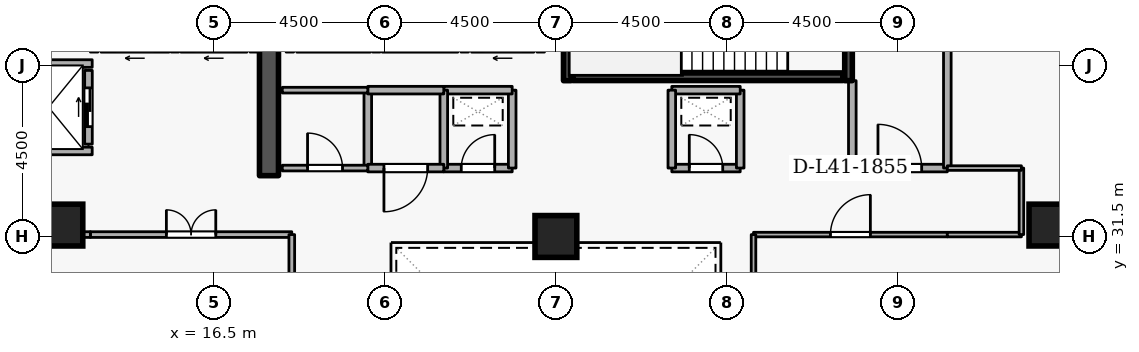
"""IFC4 building model, lengths in metres.
Left out: names, types, materials, properties, quantities, classifications, styles, units other than length and angle.
Written with IfcOpenShell. Run it as: python <this file> out.ifc"""

import sys

from ifc_helpers import new_model, si_unit, direction, frame, frame_2d, origin, origin_2d, place, context, subcontext, project, spatial, rectangle, extrude, element, fill, save


model = new_model("IFC4")
c1 = context("Model", 3, precision=1e-05, world=origin(), true_north=direction((0.0, 1.0)))
c2 = subcontext(c1, "Body", "Model", "MODEL_VIEW")
j1 = project(units=[si_unit("LENGTHUNIT", "METRE"), si_unit("PLANEANGLEUNIT", "RADIAN")], contexts=[c1])
p1 = place(None, origin())
s1 = spatial("IfcSite", under=j1, at=p1, CompositionType="ELEMENT")
p2 = place(p1, origin())
s2 = spatial("IfcBuilding", under=s1, at=p2, CompositionType="ELEMENT")
p3 = place(p2, frame((0.0, 0.0, 156.3)))
s3 = spatial("IfcBuildingStorey", under=s2, at=p3, CompositionType="ELEMENT", Elevation=156.3)
p4 = place(p3, frame((17.95, 33.1, 0.0), z_axis=(0.0, 0.0, 1.0), x_axis=(0.0, 1.0, 0.0)))
e1 = element("IfcWall", 1, at=p4, inside=s3, PredefinedType="SHEAR", context=c2, shape_type="SweptSolid", body=[
    extrude(rectangle(XDim=5.8, YDim=0.5, at=frame_2d((2.9, 0.0))), origin(), (0.0, 0.0, 1.0), 3.6),
])
for number, where, z_axis, x_axis in (
    (2, (12.5, 31.8, 0.0), (0.0, 0.0, 1.0), (1.0, 0.0, 0.0)),
    (3, (38.5, 31.8, 0.0), (0.0, 0.0, 1.0), (1.0, 0.0, 0.0)),
    (4, (25.5, 31.5, 0.0), (0.0, 0.0, 1.0), (1.0, 0.0, 0.0)),
):
    element("IfcColumn", number, at=place(p3, frame(where, z_axis=z_axis, x_axis=x_axis)), inside=s3, PredefinedType="COLUMN", context=c2, shape_type="SweptSolid", body=[
        extrude(rectangle(XDim=1.1, YDim=1.1, at=origin_2d()), origin(), (0.0, 0.0, 1.0), 3.6),
    ])
p5 = place(p3, frame((24.92, 36.45, 0.0), z_axis=(0.0, 0.0, 1.0), x_axis=(-1.0, 0.0, 0.0)))
e5 = element("IfcWall", 5, at=p5, inside=s3, PredefinedType="STANDARD", context=c2, shape_type="SweptSolid", body=[
    extrude(rectangle(XDim=1.64, YDim=0.2, at=frame_2d((0.82, 0.0))), origin(), (0.0, 0.0, 1.0), 3.34),
])
p6 = place(p5, frame((0.31, 0.0, 0.0)))
e6 = element("IfcOpeningElement", 6, at=p6, cuts=e5, PredefinedType="OPENING", context=c2, shape_type="SweptSolid", body=[
    extrude(rectangle(XDim=1.02, YDim=2.06, at=frame_2d((0.51, 1.03))), frame((0.0, 0.11, 0.0), z_axis=(0.0, -1.0, 0.0), x_axis=(1.0, 0.0, 0.0)), (0.0, 0.0, 1.0), 0.22),
])
p7 = place(p3, frame((22.92, 36.45, 0.0), z_axis=(0.0, 0.0, 1.0), x_axis=(-1.0, 0.0, 0.0)))
e7 = element("IfcWall", 7, at=p7, inside=s3, PredefinedType="STANDARD", context=c2, shape_type="SweptSolid", body=[
    extrude(rectangle(XDim=1.99, YDim=0.2, at=frame_2d((0.995, 0.0))), origin(), (0.0, 0.0, 1.0), 3.34),
])
p8 = place(p3, frame((20.62, 36.45, 0.0), z_axis=(0.0, 0.0, 1.0), x_axis=(-1.0, 0.0, 0.0)))
e8 = element("IfcWall", 8, at=p8, inside=s3, PredefinedType="STANDARD", context=c2, shape_type="SweptSolid", body=[
    extrude(rectangle(XDim=1.94, YDim=0.2, at=frame_2d((0.97, 0.0))), origin(), (0.0, 0.0, 1.0), 3.34),
])
p9 = place(p3, frame((17.37, 36.45, 0.0), z_axis=(0.0, 0.0, 1.0), x_axis=(-1.0, 0.0, 0.0)))
e9 = element("IfcWall", 9, at=p9, inside=s3, PredefinedType="STANDARD", context=c2, shape_type="SweptSolid", body=[
    extrude(rectangle(XDim=1.74, YDim=0.2, at=frame_2d((0.87, 0.0))), origin(), (0.0, 0.0, 1.0), 3.34),
])
p10 = place(p9, frame((0.36, 0.0, 0.0)))
e10 = element("IfcOpeningElement", 10, at=p10, cuts=e9, PredefinedType="OPENING", context=c2, shape_type="SweptSolid", body=[
    extrude(rectangle(XDim=1.02, YDim=2.06, at=frame_2d((0.51, 1.03))), frame((0.0, 0.11, 0.0), z_axis=(0.0, -1.0, 0.0), x_axis=(1.0, 0.0, 0.0)), (0.0, 0.0, 1.0), 0.22),
])
p11 = place(p3, frame((15.32, 36.45, 0.0), z_axis=(0.0, 0.0, 1.0), x_axis=(-1.0, 0.0, 0.0)))
e11 = element("IfcWall", 11, at=p11, inside=s3, PredefinedType="STANDARD", context=c2, shape_type="SweptSolid", body=[
    extrude(rectangle(XDim=1.79, YDim=0.2, at=frame_2d((0.895, 0.0))), origin(), (0.0, 0.0, 1.0), 3.34),
])
p12 = place(p11, frame((0.385, 0.0, 0.0)))
e12 = element("IfcOpeningElement", 12, at=p12, cuts=e11, PredefinedType="OPENING", context=c2, shape_type="SweptSolid", body=[
    extrude(rectangle(XDim=1.02, YDim=2.06, at=frame_2d((0.51, 1.03))), frame((0.0, 0.11, 0.0), z_axis=(0.0, -1.0, 0.0), x_axis=(1.0, 0.0, 0.0)), (0.0, 0.0, 1.0), 0.22),
])
p13 = place(p3, frame((13.2, 33.93, 0.0), z_axis=(0.0, 0.0, 1.0), x_axis=(0.0, 1.0, 0.0)))
e13 = element("IfcWall", 13, at=p13, inside=s3, PredefinedType="STANDARD", context=c2, shape_type="SweptSolid", body=[
    extrude(rectangle(XDim=1.94, YDim=0.2, at=frame_2d((0.97, 0.0))), origin(), (0.0, 0.0, 1.0), 3.34),
])
p14 = place(p13, frame((0.46, 0.0, 0.0)))
e14 = element("IfcOpeningElement", 14, at=p14, cuts=e13, PredefinedType="OPENING", context=c2, shape_type="SweptSolid", body=[
    extrude(rectangle(XDim=1.02, YDim=2.06, at=frame_2d((0.51, 1.03))), frame((0.0, 0.11, 0.0), z_axis=(0.0, -1.0, 0.0), x_axis=(1.0, 0.0, 0.0)), (0.0, 0.0, 1.0), 0.22),
])
for number, where, z_axis, x_axis in (
    (15, (11.002, 36.05, 0.0), (0.0, 0.0, 1.0), (1.0, 0.0, 0.0)),
    (16, (11.002, 33.75, 0.0), (0.0, 0.0, 1.0), (1.0, 0.0, 0.0)),
):
    element("IfcWall", number, at=place(p3, frame(where, z_axis=z_axis, x_axis=x_axis)), inside=s3, PredefinedType="STANDARD", context=c2, shape_type="SweptSolid", body=[
        extrude(rectangle(XDim=2.296, YDim=0.2, at=frame_2d((1.148, 0.0))), origin(), (0.0, 0.0, 1.0), 3.34),
    ])
p15 = place(p3, frame((33.2, 38.95, 0.0), z_axis=(0.0, 0.0, 1.0), x_axis=(0.0, -1.0, 0.0)))
e17 = element("IfcWall", 17, at=p15, inside=s3, PredefinedType="SHEAR", context=c2, shape_type="SweptSolid", body=[
    extrude(rectangle(XDim=3.35, YDim=0.2, at=frame_2d((1.675, 0.0))), origin(), (0.0, 0.0, 1.0), 3.6),
])
p16 = place(p15, frame((1.125, 0.0, 0.0)))
e18 = element("IfcOpeningElement", 18, at=p16, cuts=e17, PredefinedType="OPENING", context=c2, shape_type="SweptSolid", body=[
    extrude(rectangle(XDim=1.1, YDim=2.1, at=frame_2d((0.55, 1.05))), frame((0.0, 0.11, 0.0), z_axis=(0.0, -1.0, 0.0), x_axis=(1.0, 0.0, 0.0)), (0.0, 0.0, 1.0), 0.22),
])
p17 = place(p3, frame((25.8, 35.6, 0.0), z_axis=(0.0, 0.0, 1.0), x_axis=(0.0, 1.0, 0.0)))
e19 = element("IfcWall", 19, at=p17, inside=s3, PredefinedType="SHEAR", context=c2, shape_type="SweptSolid", body=[
    extrude(rectangle(XDim=3.35, YDim=0.2, at=frame_2d((1.675, 0.0))), origin(), (0.0, 0.0, 1.0), 3.6),
])
p18 = place(p3, frame((25.95, 35.703, 0.0), z_axis=(0.0, 0.0, 1.0), x_axis=(1.0, 0.0, 0.0)))
e20 = element("IfcWall", 20, at=p18, inside=s3, PredefinedType="SHEAR", context=c2, shape_type="SweptSolid", body=[
    extrude(rectangle(XDim=7.1, YDim=0.2, at=frame_2d((3.55, 0.0))), origin(), (0.0, 0.0, 1.0), 3.6),
])
p19 = place(p3, frame((33.3, 33.3, 0.0), z_axis=(0.0, 0.0, 1.0), x_axis=(1.0, 0.0, 0.0)))
e21 = element("IfcWall", 21, at=p19, inside=s3, PredefinedType="STANDARD", context=c2, shape_type="SweptSolid", body=[
    extrude(rectangle(XDim=2.5, YDim=0.2, at=frame_2d((1.25, 0.0))), origin(), (0.0, 0.0, 1.0), 3.34),
])
p20 = place(p19, frame((0.675, 0.0, 0.0)))
e22 = element("IfcOpeningElement", 22, at=p20, cuts=e21, PredefinedType="OPENING", context=c2, shape_type="SweptSolid", body=[
    extrude(rectangle(XDim=1.15, YDim=2.1, at=frame_2d((0.575, 1.05))), frame((0.0, 0.11, 0.0), z_axis=(0.0, -1.0, 0.0), x_axis=(1.0, 0.0, 0.0)), (0.0, 0.0, 1.0), 0.22),
])
p21 = place(p3, frame((35.8, 33.3, 0.0), z_axis=(0.0, 0.0, 1.0), x_axis=(0.0, 1.0, 0.0)))
e23 = element("IfcWall", 23, at=p21, inside=s3, PredefinedType="STANDARD", context=c2, shape_type="SweptSolid", body=[
    extrude(rectangle(XDim=5.7, YDim=0.2, at=frame_2d((2.85, 0.0))), origin(), (0.0, 0.0, 1.0), 3.34),
])
p22 = place(p3, frame((33.3, 35.6, 0.0), z_axis=(0.0, 0.0, 1.0), x_axis=(0.0, -1.0, 0.0)))
e24 = element("IfcWall", 24, at=p22, inside=s3, PredefinedType="STANDARD", context=c2, shape_type="SweptSolid", body=[
    extrude(rectangle(XDim=2.3, YDim=0.2, at=frame_2d((1.15, 0.0))), origin(), (0.0, 0.0, 1.0), 2.545),
])
p23 = place(p3, frame((22.55, 33.3, 0.0), z_axis=(0.0, 0.0, 1.0), x_axis=(1.0, 0.0, 0.0)))
e25 = element("IfcWall", 25, at=p23, inside=s3, PredefinedType="STANDARD", context=c2, shape_type="SweptSolid", body=[
    extrude(rectangle(XDim=1.8, YDim=0.2, at=frame_2d((0.9, 0.0))), origin(), (0.0, 0.0, 1.0), 3.34),
])
p24 = place(p23, frame((0.46, 0.0, 0.0)))
e26 = element("IfcOpeningElement", 26, at=p24, cuts=e25, PredefinedType="OPENING", context=c2, shape_type="SweptSolid", body=[
    extrude(rectangle(XDim=0.88, YDim=2.04, at=frame_2d((0.44, 1.02))), frame((0.0, 0.11, 0.0), z_axis=(0.0, -1.0, 0.0), x_axis=(1.0, 0.0, 0.0)), (0.0, 0.0, 1.0), 0.22),
])
p25 = place(p3, frame((24.35, 33.3, 0.0), z_axis=(0.0, 0.0, 1.0), x_axis=(0.0, 1.0, 0.0)))
e27 = element("IfcWall", 27, at=p25, inside=s3, PredefinedType="STANDARD", context=c2, shape_type="SweptSolid", body=[
    extrude(rectangle(XDim=2.05, YDim=0.2, at=frame_2d((1.025, 0.0))), origin(), (0.0, 0.0, 1.0), 3.34),
])
p26 = place(p3, frame((24.35, 35.35, 0.0), z_axis=(0.0, 0.0, 1.0), x_axis=(-1.0, 0.0, 0.0)))
e28 = element("IfcWall", 28, at=p26, inside=s3, PredefinedType="STANDARD", context=c2, shape_type="SweptSolid", body=[
    extrude(rectangle(XDim=1.8, YDim=0.2, at=frame_2d((0.9, 0.0))), origin(), (0.0, 0.0, 1.0), 3.34),
])
p27 = place(p3, frame((22.55, 35.35, 0.0), z_axis=(0.0, 0.0, 1.0), x_axis=(0.0, -1.0, 0.0)))
e29 = element("IfcWall", 29, at=p27, inside=s3, PredefinedType="STANDARD", context=c2, shape_type="SweptSolid", body=[
    extrude(rectangle(XDim=2.05, YDim=0.2, at=frame_2d((1.025, 0.0))), origin(), (0.0, 0.0, 1.0), 3.34),
])
p28 = place(p3, frame((28.55, 33.3, 0.0), z_axis=(0.0, 0.0, 1.0), x_axis=(1.0, 0.0, 0.0)))
e30 = element("IfcWall", 30, at=p28, inside=s3, PredefinedType="STANDARD", context=c2, shape_type="SweptSolid", body=[
    extrude(rectangle(XDim=1.8, YDim=0.2, at=frame_2d((0.9, 0.0))), origin(), (0.0, 0.0, 1.0), 3.34),
])
p29 = place(p28, frame((0.46, 0.0, 0.0)))
e31 = element("IfcOpeningElement", 31, at=p29, cuts=e30, PredefinedType="OPENING", context=c2, shape_type="SweptSolid", body=[
    extrude(rectangle(XDim=0.88, YDim=2.04, at=frame_2d((0.44, 1.02))), frame((0.0, 0.11, 0.0), z_axis=(0.0, -1.0, 0.0), x_axis=(1.0, 0.0, 0.0)), (0.0, 0.0, 1.0), 0.22),
])
p30 = place(p3, frame((30.35, 33.3, 0.0), z_axis=(0.0, 0.0, 1.0), x_axis=(0.0, 1.0, 0.0)))
e32 = element("IfcWall", 32, at=p30, inside=s3, PredefinedType="STANDARD", context=c2, shape_type="SweptSolid", body=[
    extrude(rectangle(XDim=2.05, YDim=0.2, at=frame_2d((1.025, 0.0))), origin(), (0.0, 0.0, 1.0), 3.34),
])
p31 = place(p3, frame((30.35, 35.35, 0.0), z_axis=(0.0, 0.0, 1.0), x_axis=(-1.0, 0.0, 0.0)))
e33 = element("IfcWall", 33, at=p31, inside=s3, PredefinedType="STANDARD", context=c2, shape_type="SweptSolid", body=[
    extrude(rectangle(XDim=1.8, YDim=0.2, at=frame_2d((0.9, 0.0))), origin(), (0.0, 0.0, 1.0), 3.34),
])
for number, where, z_axis, x_axis in (
    (34, (28.55, 35.35, 0.0), (0.0, 0.0, 1.0), (0.0, -1.0, 0.0)),
    (35, (20.55, 33.3, 0.0), (0.0, 0.0, 1.0), (0.0, 1.0, 0.0)),
):
    element("IfcWall", number, at=place(p3, frame(where, z_axis=z_axis, x_axis=x_axis)), inside=s3, PredefinedType="STANDARD", context=c2, shape_type="SweptSolid", body=[
        extrude(rectangle(XDim=2.05, YDim=0.2, at=frame_2d((1.025, 0.0))), origin(), (0.0, 0.0, 1.0), 3.34),
    ])
p32 = place(p3, frame((20.55, 35.35, 0.0), z_axis=(0.0, 0.0, 1.0), x_axis=(1.0, 0.0, 0.0)))
e36 = element("IfcWall", 36, at=p32, inside=s3, PredefinedType="STANDARD", context=c2, shape_type="SweptSolid", body=[
    extrude(rectangle(XDim=2.0, YDim=0.2, at=frame_2d((1.0, 0.0))), origin(), (0.0, 0.0, 1.0), 3.34),
])
p33 = place(p3, frame((22.55, 33.3, 0.0), z_axis=(0.0, 0.0, 1.0), x_axis=(-1.0, 0.0, 0.0)))
e37 = element("IfcWall", 37, at=p33, inside=s3, PredefinedType="STANDARD", context=c2, shape_type="SweptSolid", body=[
    extrude(rectangle(XDim=2.0, YDim=0.2, at=frame_2d((1.0, 0.0))), origin(), (0.0, 0.0, 1.0), 3.34),
])
p34 = place(p33, frame((0.425, 0.0, 0.0)))
e38 = element("IfcOpeningElement", 38, at=p34, cuts=e37, PredefinedType="OPENING", context=c2, shape_type="SweptSolid", body=[
    extrude(rectangle(XDim=1.15, YDim=2.1, at=frame_2d((0.575, 1.05))), frame((0.0, 0.11, 0.0), z_axis=(0.0, -1.0, 0.0), x_axis=(1.0, 0.0, 0.0)), (0.0, 0.0, 1.0), 0.22),
])
p35 = place(p3, frame((18.3, 33.3, 0.0), z_axis=(0.0, 0.0, 1.0), x_axis=(1.0, 0.0, 0.0)))
e39 = element("IfcWall", 39, at=p35, inside=s3, PredefinedType="PARTITIONING", context=c2, shape_type="SweptSolid", body=[
    extrude(rectangle(XDim=2.25, YDim=0.15, at=frame_2d((1.125, 0.0))), origin(), (0.0, 0.0, 1.0), 3.34),
])
p36 = place(p35, frame((0.665, 0.0, 0.0)))
e40 = element("IfcOpeningElement", 40, at=p36, cuts=e39, PredefinedType="OPENING", context=c2, shape_type="SweptSolid", body=[
    extrude(rectangle(XDim=0.92, YDim=2.08, at=frame_2d((0.46, 1.04))), frame((0.0, 0.085, 0.0), z_axis=(0.0, -1.0, 0.0), x_axis=(1.0, 0.0, 0.0)), (0.0, 0.0, 1.0), 0.17),
])
p37 = place(p3, frame((20.55, 35.35, 0.0), z_axis=(0.0, 0.0, 1.0), x_axis=(-1.0, 0.0, 0.0)))
e41 = element("IfcWall", 41, at=p37, inside=s3, PredefinedType="PARTITIONING", context=c2, shape_type="SweptSolid", body=[
    extrude(rectangle(XDim=2.25, YDim=0.15, at=frame_2d((1.125, 0.0))), origin(), (0.0, 0.0, 1.0), 3.34),
])
p38 = place(p3, frame((13.25, 31.55, 0.0), z_axis=(0.0, 0.0, 1.0), x_axis=(1.0, 0.0, 0.0)))
e42 = element("IfcWall", 42, at=p38, inside=s3, PredefinedType="PARTITIONING", context=c2, shape_type="SweptSolid", body=[
    extrude(rectangle(XDim=5.3, YDim=0.15, at=frame_2d((2.65, 0.0))), origin(), (0.0, 0.0, 1.0), 3.34),
])
p39 = place(p38, frame((2.0, 0.0, 0.0)))
e43 = element("IfcOpeningElement", 43, at=p39, cuts=e42, PredefinedType="OPENING", context=c2, shape_type="SweptSolid", body=[
    extrude(rectangle(XDim=1.3, YDim=2.12, at=frame_2d((0.65, 1.06))), frame((0.0, 0.085, 0.0), z_axis=(0.0, -1.0, 0.0), x_axis=(1.0, 0.0, 0.0)), (0.0, 0.0, 1.0), 0.17),
])
p40 = place(p3, frame((18.55, 31.55, 0.0), z_axis=(0.0, 0.0, 1.0), x_axis=(0.0, -1.0, 0.0)))
e44 = element("IfcWall", 44, at=p40, inside=s3, PredefinedType="PARTITIONING", context=c2, shape_type="SweptSolid", body=[
    extrude(rectangle(XDim=4.55, YDim=0.15, at=frame_2d((2.275, 0.0))), origin(), (0.0, 0.0, 1.0), 3.34),
])
p41 = place(p3, frame((10.9, 31.55, 0.0), z_axis=(0.0, 0.0, 1.0), x_axis=(1.0, 0.0, 0.0)))
e45 = element("IfcWall", 45, at=p41, inside=s3, PredefinedType="PARTITIONING", context=c2, shape_type="SweptSolid", body=[
    extrude(rectangle(XDim=2.35, YDim=0.15, at=frame_2d((1.175, 0.0))), origin(), (0.0, 0.0, 1.0), 3.34),
])
p42 = place(p3, frame((30.7, 31.55, 0.0), z_axis=(0.0, 0.0, 1.0), x_axis=(1.0, 0.0, 0.0)))
e46 = element("IfcWall", 46, at=p42, inside=s3, PredefinedType="PARTITIONING", context=c2, shape_type="SweptSolid", body=[
    extrude(rectangle(XDim=5.1, YDim=0.12, at=frame_2d((2.55, 0.0))), origin(), (0.0, 0.0, 1.0), 3.34),
])
p43 = place(p42, frame((2.025, 0.0, 0.0)))
e47 = element("IfcOpeningElement", 47, at=p43, cuts=e46, PredefinedType="OPENING", context=c2, shape_type="SweptSolid", body=[
    extrude(rectangle(XDim=1.05, YDim=2.1, at=frame_2d((0.525, 1.05))), frame((0.0, 0.07, 0.0), z_axis=(0.0, -1.0, 0.0), x_axis=(1.0, 0.0, 0.0)), (0.0, 0.0, 1.0), 0.14),
])
p44 = place(p3, frame((35.8, 31.55, 0.0), z_axis=(0.0, 0.0, 1.0), x_axis=(1.0, 0.0, 0.0)))
e48 = element("IfcWall", 48, at=p44, inside=s3, PredefinedType="PARTITIONING", context=c2, shape_type="SweptSolid", body=[
    extrude(rectangle(XDim=1.95, YDim=0.12, at=frame_2d((0.975, 0.0))), origin(), (0.0, 0.0, 1.0), 3.34),
])
p45 = place(p3, frame((37.75, 31.55, 0.0), z_axis=(0.0, 0.0, 1.0), x_axis=(0.0, 1.0, 0.0)))
e49 = element("IfcWall", 49, at=p45, inside=s3, PredefinedType="PARTITIONING", context=c2, shape_type="SweptSolid", body=[
    extrude(rectangle(XDim=1.75, YDim=0.12, at=frame_2d((0.875, 0.0))), origin(), (0.0, 0.0, 1.0), 3.34),
])
p46 = place(p3, frame((37.75, 33.3, 0.0), z_axis=(0.0, 0.0, 1.0), x_axis=(-1.0, 0.0, 0.0)))
e50 = element("IfcWall", 50, at=p46, inside=s3, PredefinedType="PARTITIONING", context=c2, shape_type="SweptSolid", body=[
    extrude(rectangle(XDim=1.95, YDim=0.12, at=frame_2d((0.975, 0.0))), origin(), (0.0, 0.0, 1.0), 3.34),
])
p47 = place(p3, frame((30.7, 27.0, 0.0), z_axis=(0.0, 0.0, 1.0), x_axis=(0.0, 1.0, 0.0)))
e51 = element("IfcWall", 51, at=p47, inside=s3, PredefinedType="PARTITIONING", context=c2, shape_type="SweptSolid", body=[
    extrude(rectangle(XDim=4.55, YDim=0.12, at=frame_2d((2.275, 0.0))), origin(), (0.0, 0.0, 1.0), 3.34),
])
p48 = place(p14, origin())
e52 = element("IfcDoor", 52, at=p48, inside=s3, OperationType="SLIDING_TO_LEFT", PredefinedType="DOOR", context=c2, shape_type="SweptSolid", body=[
    extrude(rectangle(XDim=1.02, YDim=2.06, at=frame_2d((0.51, 1.03))), frame((0.0, 0.025, 0.0), z_axis=(0.0, -1.0, 0.0), x_axis=(1.0, 0.0, 0.0)), (0.0, 0.0, 1.0), 0.05),
])
fill(e14, e52)
p49 = place(p20, origin())
e53 = element("IfcDoor", 53, at=p49, inside=s3, OperationType="SINGLE_SWING_LEFT", PredefinedType="DOOR", context=c2, shape_type="SweptSolid", body=[
    extrude(rectangle(XDim=1.15, YDim=2.1, at=frame_2d((0.575, 1.05))), frame((0.0, 0.025, 0.0), z_axis=(0.0, -1.0, 0.0), x_axis=(1.0, 0.0, 0.0)), (0.0, 0.0, 1.0), 0.05),
])
fill(e22, e53)
p50 = place(p24, origin())
e54 = element("IfcDoor", 54, at=p50, inside=s3, OperationType="SINGLE_SWING_RIGHT", PredefinedType="DOOR", context=c2, shape_type="SweptSolid", body=[
    extrude(rectangle(XDim=0.88, YDim=2.04, at=frame_2d((0.44, 1.02))), frame((0.0, 0.025, 0.0), z_axis=(0.0, -1.0, 0.0), x_axis=(1.0, 0.0, 0.0)), (0.0, 0.0, 1.0), 0.05),
])
fill(e26, e54)
p51 = place(p29, origin())
e55 = element("IfcDoor", 55, at=p51, inside=s3, OperationType="SINGLE_SWING_LEFT", PredefinedType="DOOR", context=c2, shape_type="SweptSolid", body=[
    extrude(rectangle(XDim=0.88, YDim=2.04, at=frame_2d((0.44, 1.02))), frame((0.0, 0.025, 0.0), z_axis=(0.0, -1.0, 0.0), x_axis=(1.0, 0.0, 0.0)), (0.0, 0.0, 1.0), 0.05),
])
fill(e31, e55)
p52 = place(p36, origin())
e56 = element("IfcDoor", 56, at=p52, inside=s3, OperationType="SINGLE_SWING_LEFT", PredefinedType="DOOR", context=c2, shape_type="SweptSolid", body=[
    extrude(rectangle(XDim=0.92, YDim=2.08, at=frame_2d((0.46, 1.04))), frame((0.0, 0.025, 0.0), z_axis=(0.0, -1.0, 0.0), x_axis=(1.0, 0.0, 0.0)), (0.0, 0.0, 1.0), 0.05),
])
fill(e40, e56)
p53 = place(p34, origin())
e57 = element("IfcDoor", 57, at=p53, inside=s3, OperationType="SINGLE_SWING_RIGHT", PredefinedType="DOOR", context=c2, shape_type="SweptSolid", body=[
    extrude(rectangle(XDim=1.15, YDim=2.1, at=frame_2d((0.575, 1.05))), frame((0.0, 0.025, 0.0), z_axis=(0.0, -1.0, 0.0), x_axis=(1.0, 0.0, 0.0)), (0.0, 0.0, 1.0), 0.05),
])
fill(e38, e57)
p54 = place(p39, origin())
e58 = element("IfcDoor", 58, at=p54, inside=s3, OperationType="DOUBLE_DOOR_SINGLE_SWING", PredefinedType="DOOR", context=c2, shape_type="SweptSolid", body=[
    extrude(rectangle(XDim=1.3, YDim=2.12, at=frame_2d((0.65, 1.06))), frame((0.0, 0.025, 0.0), z_axis=(0.0, -1.0, 0.0), x_axis=(1.0, 0.0, 0.0)), (0.0, 0.0, 1.0), 0.05),
])
fill(e43, e58)
p55 = place(p43, origin())
e59 = element("IfcDoor", 59, at=p55, inside=s3, OperationType="SINGLE_SWING_RIGHT", PredefinedType="DOOR", context=c2, shape_type="SweptSolid", body=[
    extrude(rectangle(XDim=1.05, YDim=2.1, at=frame_2d((0.525, 1.05))), frame((0.0, 0.025, 0.0), z_axis=(0.0, -1.0, 0.0), x_axis=(1.0, 0.0, 0.0)), (0.0, 0.0, 1.0), 0.05),
])
fill(e47, e59)
save(model, sys.argv[1])
